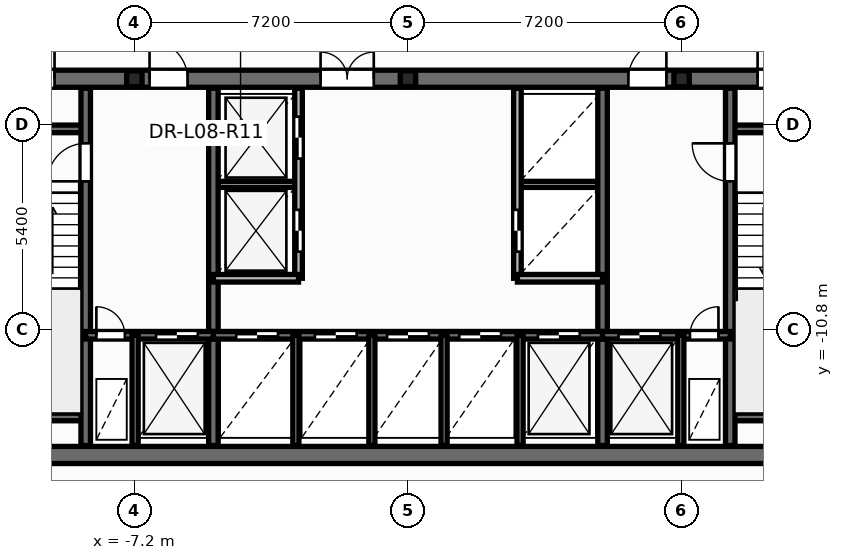
"""IFC4 building model, lengths in metres.
Left out: names, types, materials, properties, quantities, classifications, styles, units other than length and angle.
Written with IfcOpenShell. Run it as: python <this file> out.ifc"""

import sys

from ifc_helpers import new_model, si_unit, direction, frame, frame_2d, origin, origin_2d, place, context, subcontext, project, spatial, rectangle, i_section, extrude, element, fill, save


model = new_model("IFC4")
c1 = context("Model", 3, precision=1e-05, world=origin(), true_north=direction((0.0, 1.0)))
c2 = subcontext(c1, "Body", "Model", "MODEL_VIEW")
j1 = project(units=[si_unit("LENGTHUNIT", "METRE"), si_unit("PLANEANGLEUNIT", "RADIAN")], contexts=[c1])
p1 = place(None, origin())
s1 = spatial("IfcSite", under=j1, at=p1, CompositionType="ELEMENT")
p2 = place(p1, origin())
s2 = spatial("IfcBuilding", under=s1, at=p2, CompositionType="ELEMENT")
p3 = place(p2, frame((0.0, 0.0, 35.1)))
s3 = spatial("IfcBuildingStorey", under=s2, at=p3, CompositionType="ELEMENT", Elevation=35.1)
for number, where, z_axis, x_axis in (
    (1, (-7.2, -4.2, 0.0), (0.0, 0.0, 1.0), (1.0, 0.0, 0.0)),
    (2, (0.0, -4.2, 0.0), (0.0, 0.0, 1.0), (1.0, 0.0, 0.0)),
    (3, (7.2, -4.2, 0.0), (0.0, 0.0, 1.0), (1.0, 0.0, 0.0)),
):
    element("IfcColumn", number, at=place(p3, frame(where, z_axis=z_axis, x_axis=x_axis)), inside=s3, PredefinedType="PILASTER", context=c2, shape_type="SweptSolid", body=[
        extrude(i_section(OverallWidth=0.405, OverallDepth=0.414, WebThickness=0.022, FlangeThickness=0.032, at=origin_2d()), origin(), (0.0, 0.0, 1.0), 3.6),
    ])
for number, where, z_axis, x_axis in (
    (4, (-5.12, -6.98, 0.0), (0.0, 0.0, 1.0), (1.0, 0.0, 0.0)),
    (5, (2.88, -6.98, 0.0), (0.0, 0.0, 1.0), (1.0, 0.0, 0.0)),
):
    element("IfcWall", number, at=place(p3, frame(where, z_axis=z_axis, x_axis=x_axis)), inside=s3, PredefinedType="PARTITIONING", context=c2, shape_type="SweptSolid", body=[
        extrude(rectangle(XDim=2.24, YDim=0.16, at=frame_2d((1.12, 0.0))), origin(), (0.0, 0.0, 1.0), 3.35),
    ])
p4 = place(p3, frame((-12.65, -14.1, 0.0), z_axis=(0.0, 0.0, 1.0), x_axis=(1.0, 0.0, 0.0)))
e6 = element("IfcWall", 6, at=p4, inside=s3, PredefinedType="SHEAR", context=c2, shape_type="SweptSolid", body=[
    extrude(rectangle(XDim=25.3, YDim=0.45, at=frame_2d((12.65, 0.0))), origin(), (0.0, 0.0, 1.0), 3.6),
])
p5 = place(p3, frame((-12.65, -4.2, 0.0), z_axis=(0.0, 0.0, 1.0), x_axis=(1.0, 0.0, 0.0)))
e7 = element("IfcWall", 7, at=p5, inside=s3, PredefinedType="SHEAR", context=c2, shape_type="SweptSolid", body=[
    extrude(rectangle(XDim=25.3, YDim=0.45, at=frame_2d((12.65, 0.0))), origin(), (0.0, 0.0, 1.0), 3.6),
])
p6 = place(p5, frame((0.95, 0.0, 0.0)))
e8 = element("IfcOpeningElement", 8, at=p6, cuts=e7, PredefinedType="OPENING", context=c2, shape_type="SweptSolid", body=[
    extrude(rectangle(XDim=0.756, YDim=2.054, at=frame_2d((0.375, 1.027))), frame((0.0, 0.235, 0.0), z_axis=(0.0, -1.0, 0.0), x_axis=(1.0, 0.0, 0.0)), (0.0, 0.0, 1.0), 0.47),
])
p7 = place(p5, frame((2.6, 0.0, 0.0)))
e9 = element("IfcOpeningElement", 9, at=p7, cuts=e7, PredefinedType="OPENING", context=c2, shape_type="SweptSolid", body=[
    extrude(rectangle(XDim=0.756, YDim=2.054, at=frame_2d((0.375, 1.027))), frame((0.0, 0.235, 0.0), z_axis=(0.0, -1.0, 0.0), x_axis=(1.0, 0.0, 0.0)), (0.0, 0.0, 1.0), 0.47),
])
p8 = place(p5, frame((21.85, 0.0, 0.0)))
e10 = element("IfcOpeningElement", 10, at=p8, cuts=e7, PredefinedType="OPENING", context=c2, shape_type="SweptSolid", body=[
    extrude(rectangle(XDim=0.756, YDim=2.054, at=frame_2d((0.375, 1.027))), frame((0.0, 0.235, 0.0), z_axis=(0.0, -1.0, 0.0), x_axis=(1.0, 0.0, 0.0)), (0.0, 0.0, 1.0), 0.47),
])
p9 = place(p5, frame((23.5, 0.0, 0.0)))
e11 = element("IfcOpeningElement", 11, at=p9, cuts=e7, PredefinedType="OPENING", context=c2, shape_type="SweptSolid", body=[
    extrude(rectangle(XDim=0.756, YDim=2.054, at=frame_2d((0.375, 1.027))), frame((0.0, 0.235, 0.0), z_axis=(0.0, -1.0, 0.0), x_axis=(1.0, 0.0, 0.0)), (0.0, 0.0, 1.0), 0.47),
])
p10 = place(p5, frame((5.85, 0.0, 0.0)))
e12 = element("IfcOpeningElement", 12, at=p10, cuts=e7, PredefinedType="OPENING", context=c2, shape_type="SweptSolid", body=[
    extrude(rectangle(XDim=1.006, YDim=2.104, at=frame_2d((0.5, 1.052))), frame((0.0, 0.235, 0.0), z_axis=(0.0, -1.0, 0.0), x_axis=(1.0, 0.0, 0.0)), (0.0, 0.0, 1.0), 0.47),
])
p11 = place(p5, frame((10.35, 0.0, 0.0)))
e13 = element("IfcOpeningElement", 13, at=p11, cuts=e7, PredefinedType="OPENING", context=c2, shape_type="SweptSolid", body=[
    extrude(rectangle(XDim=1.406, YDim=2.154, at=frame_2d((0.7, 1.077))), frame((0.0, 0.235, 0.0), z_axis=(0.0, -1.0, 0.0), x_axis=(1.0, 0.0, 0.0)), (0.0, 0.0, 1.0), 0.47),
])
p12 = place(p5, frame((18.45, 0.0, 0.0)))
e14 = element("IfcOpeningElement", 14, at=p12, cuts=e7, PredefinedType="OPENING", context=c2, shape_type="SweptSolid", body=[
    extrude(rectangle(XDim=1.006, YDim=2.104, at=frame_2d((0.5, 1.052))), frame((0.0, 0.235, 0.0), z_axis=(0.0, -1.0, 0.0), x_axis=(1.0, 0.0, 0.0)), (0.0, 0.0, 1.0), 0.47),
])
for number, where, z_axis, x_axis in (
    (15, (-12.35, -5.52, 0.0), (0.0, 0.0, 1.0), (1.0, 0.0, 0.0)),
    (16, (-12.35, -13.1, 0.0), (0.0, 0.0, 1.0), (1.0, 0.0, 0.0)),
    (17, (8.48, -5.52, 0.0), (0.0, 0.0, 1.0), (1.0, 0.0, 0.0)),
    (18, (8.48, -13.1, 0.0), (0.0, 0.0, 1.0), (1.0, 0.0, 0.0)),
):
    element("IfcWall", number, at=place(p3, frame(where, z_axis=z_axis, x_axis=x_axis)), inside=s3, PredefinedType="SOLIDWALL", context=c2, shape_type="SweptSolid", body=[
        extrude(rectangle(XDim=3.87, YDim=0.2, at=frame_2d((1.935, 0.0))), origin(), (0.0, 0.0, 1.0), 3.6),
    ])
p13 = place(p3, frame((-8.48, -13.85, 0.0), z_axis=(0.0, 0.0, 1.0), x_axis=(0.0, 1.0, 0.0)))
e19 = element("IfcWall", 19, at=p13, inside=s3, PredefinedType="SHEAR", context=c2, shape_type="SweptSolid", body=[
    extrude(rectangle(XDim=9.4, YDim=0.25, at=frame_2d((4.7, 0.0))), origin(), (0.0, 0.0, 1.0), 3.6),
])
p14 = place(p13, frame((6.95, 0.0, 0.0)))
e20 = element("IfcOpeningElement", 20, at=p14, cuts=e19, PredefinedType="OPENING", context=c2, shape_type="SweptSolid", body=[
    extrude(rectangle(XDim=1.006, YDim=2.104, at=frame_2d((0.5, 1.052))), frame((0.0, 0.135, 0.0), z_axis=(0.0, -1.0, 0.0), x_axis=(1.0, 0.0, 0.0)), (0.0, 0.0, 1.0), 0.27),
])
p15 = place(p3, frame((8.48, -13.85, 0.0), z_axis=(0.0, 0.0, 1.0), x_axis=(0.0, 1.0, 0.0)))
e21 = element("IfcWall", 21, at=p15, inside=s3, PredefinedType="SHEAR", context=c2, shape_type="SweptSolid", body=[
    extrude(rectangle(XDim=9.4, YDim=0.25, at=frame_2d((4.7, 0.0))), origin(), (0.0, 0.0, 1.0), 3.6),
])
p16 = place(p15, frame((6.95, 0.0, 0.0)))
e22 = element("IfcOpeningElement", 22, at=p16, cuts=e21, PredefinedType="OPENING", context=c2, shape_type="SweptSolid", body=[
    extrude(rectangle(XDim=1.006, YDim=2.104, at=frame_2d((0.5, 1.052))), frame((0.0, 0.135, 0.0), z_axis=(0.0, -1.0, 0.0), x_axis=(1.0, 0.0, 0.0)), (0.0, 0.0, 1.0), 0.27),
])
for number, where, z_axis, x_axis in (
    (23, (-5.12, -13.85, 0.0), (0.0, 0.0, 1.0), (0.0, 1.0, 0.0)),
    (24, (5.12, -13.85, 0.0), (0.0, 0.0, 1.0), (0.0, 1.0, 0.0)),
):
    element("IfcWall", number, at=place(p3, frame(where, z_axis=z_axis, x_axis=x_axis)), inside=s3, PredefinedType="SHEAR", context=c2, shape_type="SweptSolid", body=[
        extrude(rectangle(XDim=9.4, YDim=0.25, at=frame_2d((4.7, 0.0))), origin(), (0.0, 0.0, 1.0), 3.6),
    ])
p17 = place(p3, frame((-8.48, -10.95, 0.0), z_axis=(0.0, 0.0, 1.0), x_axis=(1.0, 0.0, 0.0)))
e25 = element("IfcWall", 25, at=p17, inside=s3, PredefinedType="SOLIDWALL", context=c2, shape_type="SweptSolid", body=[
    extrude(rectangle(XDim=3.36, YDim=0.2, at=frame_2d((1.68, 0.0))), origin(), (0.0, 0.0, 1.0), 3.6),
])
p18 = place(p17, frame((0.28, 0.0, 0.0)))
e26 = element("IfcOpeningElement", 26, at=p18, cuts=e25, PredefinedType="OPENING", context=c2, shape_type="SweptSolid", body=[
    extrude(rectangle(XDim=0.756, YDim=2.054, at=frame_2d((0.375, 1.027))), frame((0.0, 0.11, 0.0), z_axis=(0.0, -1.0, 0.0), x_axis=(1.0, 0.0, 0.0)), (0.0, 0.0, 1.0), 0.22),
])
p19 = place(p17, frame((1.85, 0.0, 0.0)))
e27 = element("IfcOpeningElement", 27, at=p19, cuts=e25, PredefinedType="OPENING", context=c2, shape_type="SweptSolid", body=[
    extrude(rectangle(XDim=1.106, YDim=2.104, at=frame_2d((0.55, 1.052))), frame((0.0, 0.11, 0.0), z_axis=(0.0, -1.0, 0.0), x_axis=(1.0, 0.0, 0.0)), (0.0, 0.0, 1.0), 0.22),
])
p20 = place(p3, frame((-5.12, -10.95, 0.0), z_axis=(0.0, 0.0, 1.0), x_axis=(1.0, 0.0, 0.0)))
e28 = element("IfcWall", 28, at=p20, inside=s3, PredefinedType="SOLIDWALL", context=c2, shape_type="SweptSolid", body=[
    extrude(rectangle(XDim=10.24, YDim=0.2, at=frame_2d((5.12, 0.0))), origin(), (0.0, 0.0, 1.0), 3.6),
])
p21 = place(p20, frame((0.6, 0.0, 0.0)))
e29 = element("IfcOpeningElement", 29, at=p21, cuts=e28, PredefinedType="OPENING", context=c2, shape_type="SweptSolid", body=[
    extrude(rectangle(XDim=1.106, YDim=2.104, at=frame_2d((0.55, 1.052))), frame((0.0, 0.11, 0.0), z_axis=(0.0, -1.0, 0.0), x_axis=(1.0, 0.0, 0.0)), (0.0, 0.0, 1.0), 0.22),
])
p22 = place(p20, frame((2.67, 0.0, 0.0)))
e30 = element("IfcOpeningElement", 30, at=p22, cuts=e28, PredefinedType="OPENING", context=c2, shape_type="SweptSolid", body=[
    extrude(rectangle(XDim=1.106, YDim=2.104, at=frame_2d((0.55, 1.052))), frame((0.0, 0.11, 0.0), z_axis=(0.0, -1.0, 0.0), x_axis=(1.0, 0.0, 0.0)), (0.0, 0.0, 1.0), 0.22),
])
p23 = place(p20, frame((4.57, 0.0, 0.0)))
e31 = element("IfcOpeningElement", 31, at=p23, cuts=e28, PredefinedType="OPENING", context=c2, shape_type="SweptSolid", body=[
    extrude(rectangle(XDim=1.106, YDim=2.104, at=frame_2d((0.55, 1.052))), frame((0.0, 0.11, 0.0), z_axis=(0.0, -1.0, 0.0), x_axis=(1.0, 0.0, 0.0)), (0.0, 0.0, 1.0), 0.22),
])
p24 = place(p20, frame((6.47, 0.0, 0.0)))
e32 = element("IfcOpeningElement", 32, at=p24, cuts=e28, PredefinedType="OPENING", context=c2, shape_type="SweptSolid", body=[
    extrude(rectangle(XDim=1.106, YDim=2.104, at=frame_2d((0.55, 1.052))), frame((0.0, 0.11, 0.0), z_axis=(0.0, -1.0, 0.0), x_axis=(1.0, 0.0, 0.0)), (0.0, 0.0, 1.0), 0.22),
])
p25 = place(p20, frame((8.54, 0.0, 0.0)))
e33 = element("IfcOpeningElement", 33, at=p25, cuts=e28, PredefinedType="OPENING", context=c2, shape_type="SweptSolid", body=[
    extrude(rectangle(XDim=1.106, YDim=2.104, at=frame_2d((0.55, 1.052))), frame((0.0, 0.11, 0.0), z_axis=(0.0, -1.0, 0.0), x_axis=(1.0, 0.0, 0.0)), (0.0, 0.0, 1.0), 0.22),
])
p26 = place(p3, frame((5.12, -10.95, 0.0), z_axis=(0.0, 0.0, 1.0), x_axis=(1.0, 0.0, 0.0)))
e34 = element("IfcWall", 34, at=p26, inside=s3, PredefinedType="SOLIDWALL", context=c2, shape_type="SweptSolid", body=[
    extrude(rectangle(XDim=3.36, YDim=0.2, at=frame_2d((1.68, 0.0))), origin(), (0.0, 0.0, 1.0), 3.6),
])
p27 = place(p26, frame((0.42, 0.0, 0.0)))
e35 = element("IfcOpeningElement", 35, at=p27, cuts=e34, PredefinedType="OPENING", context=c2, shape_type="SweptSolid", body=[
    extrude(rectangle(XDim=1.106, YDim=2.104, at=frame_2d((0.55, 1.052))), frame((0.0, 0.11, 0.0), z_axis=(0.0, -1.0, 0.0), x_axis=(1.0, 0.0, 0.0)), (0.0, 0.0, 1.0), 0.22),
])
p28 = place(p26, frame((2.3, 0.0, 0.0)))
e36 = element("IfcOpeningElement", 36, at=p28, cuts=e34, PredefinedType="OPENING", context=c2, shape_type="SweptSolid", body=[
    extrude(rectangle(XDim=0.756, YDim=2.054, at=frame_2d((0.375, 1.027))), frame((0.0, 0.11, 0.0), z_axis=(0.0, -1.0, 0.0), x_axis=(1.0, 0.0, 0.0)), (0.0, 0.0, 1.0), 0.22),
])
for number, where, z_axis, x_axis in (
    (37, (-7.18, -13.85, 0.0), (0.0, 0.0, 1.0), (0.0, 1.0, 0.0)),
    (38, (7.18, -13.85, 0.0), (0.0, 0.0, 1.0), (0.0, 1.0, 0.0)),
    (39, (-2.95, -13.85, 0.0), (0.0, 0.0, 1.0), (0.0, 1.0, 0.0)),
    (40, (2.95, -13.85, 0.0), (0.0, 0.0, 1.0), (0.0, 1.0, 0.0)),
):
    element("IfcWall", number, at=place(p3, frame(where, z_axis=z_axis, x_axis=x_axis)), inside=s3, PredefinedType="PARTITIONING", context=c2, shape_type="SweptSolid", body=[
        extrude(rectangle(XDim=2.9, YDim=0.16, at=frame_2d((1.45, 0.0))), origin(), (0.0, 0.0, 1.0), 2.375),
    ])
p29 = place(p3, frame((-2.88, -9.45, 0.0), z_axis=(0.0, 0.0, 1.0), x_axis=(0.0, 1.0, 0.0)))
e41 = element("IfcWall", 41, at=p29, inside=s3, PredefinedType="SOLIDWALL", context=c2, shape_type="SweptSolid", body=[
    extrude(rectangle(XDim=5.0, YDim=0.2, at=frame_2d((2.5, 0.0))), origin(), (0.0, 0.0, 1.0), 3.35),
])
p30 = place(p29, frame((0.7, 0.0, 0.0)))
e42 = element("IfcOpeningElement", 42, at=p30, cuts=e41, PredefinedType="OPENING", context=c2, shape_type="SweptSolid", body=[
    extrude(rectangle(XDim=1.106, YDim=2.104, at=frame_2d((0.55, 1.052))), frame((0.0, 0.11, 0.0), z_axis=(0.0, -1.0, 0.0), x_axis=(1.0, 0.0, 0.0)), (0.0, 0.0, 1.0), 0.22),
])
p31 = place(p29, frame((3.15, 0.0, 0.0)))
e43 = element("IfcOpeningElement", 43, at=p31, cuts=e41, PredefinedType="OPENING", context=c2, shape_type="SweptSolid", body=[
    extrude(rectangle(XDim=1.106, YDim=2.104, at=frame_2d((0.55, 1.052))), frame((0.0, 0.11, 0.0), z_axis=(0.0, -1.0, 0.0), x_axis=(1.0, 0.0, 0.0)), (0.0, 0.0, 1.0), 0.22),
])
p32 = place(p3, frame((-5.12, -9.45, 0.0), z_axis=(0.0, 0.0, 1.0), x_axis=(1.0, 0.0, 0.0)))
e44 = element("IfcWall", 44, at=p32, inside=s3, PredefinedType="SOLIDWALL", context=c2, shape_type="SweptSolid", body=[
    extrude(rectangle(XDim=2.24, YDim=0.2, at=frame_2d((1.12, 0.0))), origin(), (0.0, 0.0, 1.0), 3.35),
])
p33 = place(p3, frame((2.88, -9.45, 0.0), z_axis=(0.0, 0.0, 1.0), x_axis=(0.0, 1.0, 0.0)))
e45 = element("IfcWall", 45, at=p33, inside=s3, PredefinedType="SOLIDWALL", context=c2, shape_type="SweptSolid", body=[
    extrude(rectangle(XDim=5.0, YDim=0.2, at=frame_2d((2.5, 0.0))), origin(), (0.0, 0.0, 1.0), 3.35),
])
p34 = place(p33, frame((0.7, 0.0, 0.0)))
e46 = element("IfcOpeningElement", 46, at=p34, cuts=e45, PredefinedType="OPENING", context=c2, shape_type="SweptSolid", body=[
    extrude(rectangle(XDim=1.106, YDim=2.104, at=frame_2d((0.55, 1.052))), frame((0.0, 0.11, 0.0), z_axis=(0.0, -1.0, 0.0), x_axis=(1.0, 0.0, 0.0)), (0.0, 0.0, 1.0), 0.22),
])
p35 = place(p3, frame((2.88, -9.45, 0.0), z_axis=(0.0, 0.0, 1.0), x_axis=(1.0, 0.0, 0.0)))
e47 = element("IfcWall", 47, at=p35, inside=s3, PredefinedType="SOLIDWALL", context=c2, shape_type="SweptSolid", body=[
    extrude(rectangle(XDim=2.24, YDim=0.2, at=frame_2d((1.12, 0.0))), origin(), (0.0, 0.0, 1.0), 3.35),
])
for number, where, z_axis, x_axis in (
    (48, (-0.95, -13.85, 0.0), (0.0, 0.0, 1.0), (0.0, 1.0, 0.0)),
    (49, (0.95, -13.85, 0.0), (0.0, 0.0, 1.0), (0.0, 1.0, 0.0)),
):
    element("IfcWall", number, at=place(p3, frame(where, z_axis=z_axis, x_axis=x_axis)), inside=s3, PredefinedType="PARTITIONING", context=c2, shape_type="SweptSolid", body=[
        extrude(rectangle(XDim=2.9, YDim=0.16, at=frame_2d((1.45, 0.0))), origin(), (0.0, 0.0, 1.0), 2.375),
    ])
p36 = place(p30, origin())
e50 = element("IfcDoor", 50, at=p36, inside=s3, OperationType="DOUBLE_DOOR_SLIDING", PredefinedType="DOOR", context=c2, shape_type="SweptSolid", body=[
    extrude(rectangle(XDim=1.1, YDim=2.1, at=frame_2d((0.55, 1.05))), frame((0.0, 0.025, 0.0), z_axis=(0.0, -1.0, 0.0), x_axis=(1.0, 0.0, 0.0)), (0.0, 0.0, 1.0), 0.05),
])
fill(e42, e50)
p37 = place(p31, origin())
e51 = element("IfcDoor", 51, at=p37, inside=s3, OperationType="DOUBLE_DOOR_SLIDING", PredefinedType="DOOR", context=c2, shape_type="SweptSolid", body=[
    extrude(rectangle(XDim=1.1, YDim=2.1, at=frame_2d((0.55, 1.05))), frame((0.0, 0.025, 0.0), z_axis=(0.0, -1.0, 0.0), x_axis=(1.0, 0.0, 0.0)), (0.0, 0.0, 1.0), 0.05),
])
fill(e43, e51)
p38 = place(p34, origin())
e52 = element("IfcDoor", 52, at=p38, inside=s3, OperationType="DOUBLE_DOOR_SLIDING", PredefinedType="DOOR", context=c2, shape_type="SweptSolid", body=[
    extrude(rectangle(XDim=1.1, YDim=2.1, at=frame_2d((0.55, 1.05))), frame((0.0, 0.025, 0.0), z_axis=(0.0, -1.0, 0.0), x_axis=(1.0, 0.0, 0.0)), (0.0, 0.0, 1.0), 0.05),
])
fill(e46, e52)
p39 = place(p14, origin())
e53 = element("IfcDoor", 53, at=p39, inside=s3, OperationType="SINGLE_SWING_LEFT", PredefinedType="DOOR", context=c2, shape_type="SweptSolid", body=[
    extrude(rectangle(XDim=1.0, YDim=2.1, at=frame_2d((0.5, 1.05))), frame((0.0, 0.025, 0.0), z_axis=(0.0, -1.0, 0.0), x_axis=(1.0, 0.0, 0.0)), (0.0, 0.0, 1.0), 0.05),
])
fill(e20, e53)
p40 = place(p16, origin())
e54 = element("IfcDoor", 54, at=p40, inside=s3, OperationType="SINGLE_SWING_RIGHT", PredefinedType="DOOR", context=c2, shape_type="SweptSolid", body=[
    extrude(rectangle(XDim=1.0, YDim=2.1, at=frame_2d((0.5, 1.05))), frame((0.0, 0.025, 0.0), z_axis=(0.0, -1.0, 0.0), x_axis=(1.0, 0.0, 0.0)), (0.0, 0.0, 1.0), 0.05),
])
fill(e22, e54)
p41 = place(p18, origin())
e55 = element("IfcDoor", 55, at=p41, inside=s3, OperationType="SINGLE_SWING_LEFT", PredefinedType="DOOR", context=c2, shape_type="SweptSolid", body=[
    extrude(rectangle(XDim=0.75, YDim=2.05, at=frame_2d((0.375, 1.025))), frame((0.0, 0.025, 0.0), z_axis=(0.0, -1.0, 0.0), x_axis=(1.0, 0.0, 0.0)), (0.0, 0.0, 1.0), 0.05),
])
fill(e26, e55)
p42 = place(p19, origin())
e56 = element("IfcDoor", 56, at=p42, inside=s3, OperationType="DOUBLE_DOOR_SLIDING", PredefinedType="DOOR", context=c2, shape_type="SweptSolid", body=[
    extrude(rectangle(XDim=1.1, YDim=2.1, at=frame_2d((0.55, 1.05))), frame((0.0, 0.025, 0.0), z_axis=(0.0, -1.0, 0.0), x_axis=(1.0, 0.0, 0.0)), (0.0, 0.0, 1.0), 0.05),
])
fill(e27, e56)
p43 = place(p27, origin())
e57 = element("IfcDoor", 57, at=p43, inside=s3, OperationType="DOUBLE_DOOR_SLIDING", PredefinedType="DOOR", context=c2, shape_type="SweptSolid", body=[
    extrude(rectangle(XDim=1.1, YDim=2.1, at=frame_2d((0.55, 1.05))), frame((0.0, 0.025, 0.0), z_axis=(0.0, -1.0, 0.0), x_axis=(1.0, 0.0, 0.0)), (0.0, 0.0, 1.0), 0.05),
])
fill(e35, e57)
p44 = place(p28, origin())
e58 = element("IfcDoor", 58, at=p44, inside=s3, OperationType="SINGLE_SWING_RIGHT", PredefinedType="DOOR", context=c2, shape_type="SweptSolid", body=[
    extrude(rectangle(XDim=0.75, YDim=2.05, at=frame_2d((0.375, 1.025))), frame((0.0, 0.025, 0.0), z_axis=(0.0, -1.0, 0.0), x_axis=(1.0, 0.0, 0.0)), (0.0, 0.0, 1.0), 0.05),
])
fill(e36, e58)
p45 = place(p21, origin())
e59 = element("IfcDoor", 59, at=p45, inside=s3, OperationType="DOUBLE_DOOR_SLIDING", PredefinedType="DOOR", context=c2, shape_type="SweptSolid", body=[
    extrude(rectangle(XDim=1.1, YDim=2.1, at=frame_2d((0.55, 1.05))), frame((0.0, 0.025, 0.0), z_axis=(0.0, -1.0, 0.0), x_axis=(1.0, 0.0, 0.0)), (0.0, 0.0, 1.0), 0.05),
])
fill(e29, e59)
p46 = place(p22, origin())
e60 = element("IfcDoor", 60, at=p46, inside=s3, OperationType="DOUBLE_DOOR_SLIDING", PredefinedType="DOOR", context=c2, shape_type="SweptSolid", body=[
    extrude(rectangle(XDim=1.1, YDim=2.1, at=frame_2d((0.55, 1.05))), frame((0.0, 0.025, 0.0), z_axis=(0.0, -1.0, 0.0), x_axis=(1.0, 0.0, 0.0)), (0.0, 0.0, 1.0), 0.05),
])
fill(e30, e60)
p47 = place(p23, origin())
e61 = element("IfcDoor", 61, at=p47, inside=s3, OperationType="DOUBLE_DOOR_SLIDING", PredefinedType="DOOR", context=c2, shape_type="SweptSolid", body=[
    extrude(rectangle(XDim=1.1, YDim=2.1, at=frame_2d((0.55, 1.05))), frame((0.0, 0.025, 0.0), z_axis=(0.0, -1.0, 0.0), x_axis=(1.0, 0.0, 0.0)), (0.0, 0.0, 1.0), 0.05),
])
fill(e31, e61)
p48 = place(p24, origin())
e62 = element("IfcDoor", 62, at=p48, inside=s3, OperationType="DOUBLE_DOOR_SLIDING", PredefinedType="DOOR", context=c2, shape_type="SweptSolid", body=[
    extrude(rectangle(XDim=1.1, YDim=2.1, at=frame_2d((0.55, 1.05))), frame((0.0, 0.025, 0.0), z_axis=(0.0, -1.0, 0.0), x_axis=(1.0, 0.0, 0.0)), (0.0, 0.0, 1.0), 0.05),
])
fill(e32, e62)
p49 = place(p25, origin())
e63 = element("IfcDoor", 63, at=p49, inside=s3, OperationType="DOUBLE_DOOR_SLIDING", PredefinedType="DOOR", context=c2, shape_type="SweptSolid", body=[
    extrude(rectangle(XDim=1.1, YDim=2.1, at=frame_2d((0.55, 1.05))), frame((0.0, 0.025, 0.0), z_axis=(0.0, -1.0, 0.0), x_axis=(1.0, 0.0, 0.0)), (0.0, 0.0, 1.0), 0.05),
])
fill(e33, e63)
p50 = place(p7, origin())
e64 = element("IfcDoor", 64, at=p50, inside=s3, OperationType="SINGLE_SWING_RIGHT", PredefinedType="DOOR", context=c2, shape_type="SweptSolid", body=[
    extrude(rectangle(XDim=0.75, YDim=2.05, at=frame_2d((0.375, 1.025))), frame((0.0, 0.025, 0.0), z_axis=(0.0, -1.0, 0.0), x_axis=(1.0, 0.0, 0.0)), (0.0, 0.0, 1.0), 0.05),
])
fill(e9, e64)
p51 = place(p8, origin())
e65 = element("IfcDoor", 65, at=p51, inside=s3, OperationType="SINGLE_SWING_LEFT", PredefinedType="DOOR", context=c2, shape_type="SweptSolid", body=[
    extrude(rectangle(XDim=0.75, YDim=2.05, at=frame_2d((0.375, 1.025))), frame((0.0, 0.025, 0.0), z_axis=(0.0, -1.0, 0.0), x_axis=(1.0, 0.0, 0.0)), (0.0, 0.0, 1.0), 0.05),
])
fill(e10, e65)
p52 = place(p10, origin())
e66 = element("IfcDoor", 66, at=p52, inside=s3, OperationType="SINGLE_SWING_LEFT", PredefinedType="DOOR", context=c2, shape_type="SweptSolid", body=[
    extrude(rectangle(XDim=1.0, YDim=2.1, at=frame_2d((0.5, 1.05))), frame((0.0, 0.025, 0.0), z_axis=(0.0, -1.0, 0.0), x_axis=(1.0, 0.0, 0.0)), (0.0, 0.0, 1.0), 0.05),
])
fill(e12, e66)
p53 = place(p11, origin())
e67 = element("IfcDoor", 67, at=p53, inside=s3, OperationType="DOUBLE_DOOR_SINGLE_SWING", PredefinedType="DOOR", context=c2, shape_type="SweptSolid", body=[
    extrude(rectangle(XDim=1.4, YDim=2.15, at=frame_2d((0.7, 1.075))), frame((0.0, 0.025, 0.0), z_axis=(0.0, -1.0, 0.0), x_axis=(1.0, 0.0, 0.0)), (0.0, 0.0, 1.0), 0.05),
])
fill(e13, e67)
p54 = place(p12, origin())
e68 = element("IfcDoor", 68, at=p54, inside=s3, OperationType="SINGLE_SWING_RIGHT", PredefinedType="DOOR", context=c2, shape_type="SweptSolid", body=[
    extrude(rectangle(XDim=1.0, YDim=2.1, at=frame_2d((0.5, 1.05))), frame((0.0, 0.025, 0.0), z_axis=(0.0, -1.0, 0.0), x_axis=(1.0, 0.0, 0.0)), (0.0, 0.0, 1.0), 0.05),
])
fill(e14, e68)
save(model, sys.argv[1])
